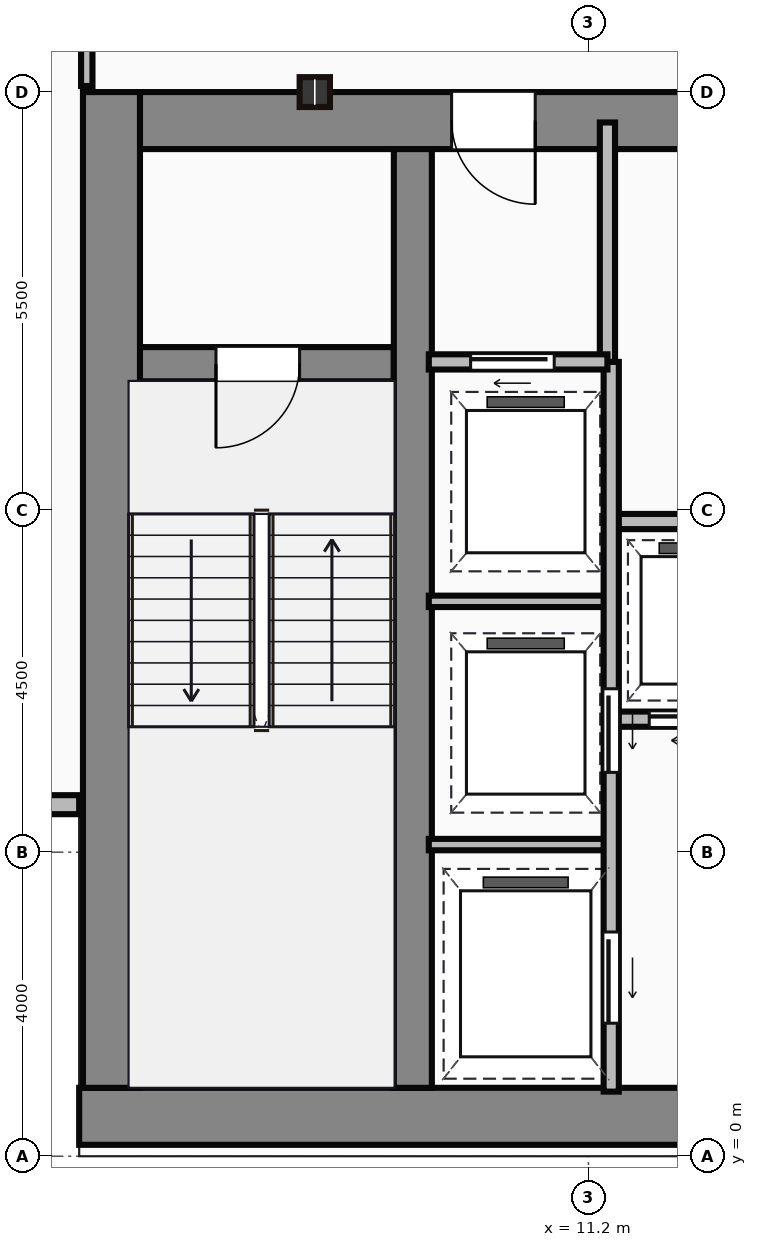
"""IFC4 building model, lengths in metres.
Left out: names, types, materials, properties, quantities, classifications, styles, units other than length and angle.
Written with IfcOpenShell. Run it as: python <this file> out.ifc"""

import sys

from ifc_helpers import new_model, si_unit, direction, frame, frame_2d, origin, origin_2d, place, context, subcontext, project, spatial, rectangle, i_section, extrude, source, transform, mapped, element, fill, save


model = new_model("IFC4")
c1 = context("Model", 3, precision=1e-05, world=origin(), true_north=direction((0.0, 1.0)))
c2 = subcontext(c1, "Body", "Model", "MODEL_VIEW")
j1 = project(units=[si_unit("LENGTHUNIT", "METRE"), si_unit("PLANEANGLEUNIT", "RADIAN")], contexts=[c1])
p1 = place(None, origin())
s1 = spatial("IfcSite", under=j1, at=p1, CompositionType="ELEMENT")
p2 = place(p1, origin())
s2 = spatial("IfcBuilding", under=s1, at=p2, CompositionType="ELEMENT")
p3 = place(p2, frame((0.0, 0.0, 95.95)))
s3 = spatial("IfcBuildingStorey", under=s2, at=p3, CompositionType="ELEMENT", Elevation=95.95)
m1 = source(origin(), c2, "Body", "SweptSolid", [
    extrude(rectangle(XDim=29.5, YDim=0.75, at=frame_2d((14.75, 0.0))), origin(), (0.0, 0.0, 1.0), 3.65),
])
p4 = place(p3, frame((4.5, 0.525, 0.0), z_axis=(0.0, 0.0, 1.0), x_axis=(1.0, 0.0, 0.0)))
e1 = element("IfcWall", 1, at=p4, inside=s3, PredefinedType="SHEAR", context=c2, shape_type="MappedRepresentation", body=[
    mapped(m1, transform((0.0, 0.0, 0.0))),
])
m2 = source(origin(), c2, "Body", "SweptSolid", [
    extrude(rectangle(XDim=13.1, YDim=0.75, at=frame_2d((6.55, 0.0))), origin(), (0.0, 0.0, 1.0), 3.65),
])
p5 = place(p3, frame((4.925, 0.9, 0.0), z_axis=(0.0, 0.0, 1.0), x_axis=(0.0, 1.0, 0.0)))
e2 = element("IfcWall", 2, at=p5, inside=s3, PredefinedType="SHEAR", context=c2, shape_type="MappedRepresentation", body=[
    mapped(m2, transform((0.0, 0.0, 0.0))),
])
m3 = source(origin(), c2, "Body", "SweptSolid", [
    extrude(rectangle(XDim=9.1, YDim=0.75, at=frame_2d((4.55, 0.0))), origin(), (0.0, 0.0, 1.0), 3.65),
])
p6 = place(p3, frame((5.3, 13.625, 0.0), z_axis=(0.0, 0.0, 1.0), x_axis=(1.0, 0.0, 0.0)))
e3 = element("IfcWall", 3, at=p6, inside=s3, PredefinedType="SHEAR", context=c2, shape_type="MappedRepresentation", body=[
    mapped(m3, transform((0.0, 0.0, 0.0))),
])
p7 = place(p6, frame((4.1, 0.0, 0.0)))
e4 = element("IfcOpeningElement", 4, at=p7, cuts=e3, PredefinedType="OPENING", context=c2, shape_type="SweptSolid", body=[
    extrude(rectangle(XDim=1.1, YDim=2.15, at=frame_2d((0.55, 1.075))), frame((0.0, 0.385, 0.0), z_axis=(0.0, -1.0, 0.0), x_axis=(1.0, 0.0, 0.0)), (0.0, 0.0, 1.0), 0.77),
])
m4 = source(origin(), c2, "Body", "SweptSolid", [
    extrude(rectangle(XDim=12.35, YDim=0.5, at=frame_2d((6.175, 0.0))), origin(), (0.0, 0.0, 1.0), 3.65),
])
p8 = place(p3, frame((8.89, 0.9, 0.0), z_axis=(0.0, 0.0, 1.0), x_axis=(0.0, 1.0, 0.0)))
e5 = element("IfcWall", 5, at=p8, inside=s3, PredefinedType="SHEAR", context=c2, shape_type="MappedRepresentation", body=[
    mapped(m4, transform((0.0, 0.0, 0.0))),
])
m5 = source(origin(), c2, "Body", "SweptSolid", [
    extrude(rectangle(XDim=3.39, YDim=0.45, at=frame_2d((1.695, 0.0))), origin(), (0.0, 0.0, 1.0), 3.65),
])
p9 = place(p3, frame((5.25, 10.42, 0.0), z_axis=(0.0, 0.0, 1.0), x_axis=(1.0, 0.0, 0.0)))
e6 = element("IfcWall", 6, at=p9, inside=s3, PredefinedType="SHEAR", context=c2, shape_type="MappedRepresentation", body=[
    mapped(m5, transform((0.0, 0.0, 0.0))),
])
p10 = place(p9, frame((1.05, 0.0, 0.0)))
e7 = element("IfcOpeningElement", 7, at=p10, cuts=e6, PredefinedType="OPENING", context=c2, shape_type="SweptSolid", body=[
    extrude(rectangle(XDim=1.1, YDim=2.15, at=frame_2d((0.55, 1.075))), frame((0.0, 0.235, 0.0), z_axis=(0.0, -1.0, 0.0), x_axis=(1.0, 0.0, 0.0)), (0.0, 0.0, 1.0), 0.47),
])
m6 = source(origin(), c2, "Body", "SweptSolid", [
    extrude(i_section(OverallWidth=0.399, OverallDepth=0.393, WebThickness=0.023, FlangeThickness=0.037, at=origin_2d()), origin(), (0.0, 0.0, 1.0), 3.65),
])
p11 = place(p3, frame((7.6, 14.0, 0.0), z_axis=(0.0, 0.0, 1.0), x_axis=(1.0, 0.0, 0.0)))
e8 = element("IfcColumn", 8, at=p11, inside=s3, PredefinedType="COLUMN", context=c2, shape_type="MappedRepresentation", body=[
    mapped(m6, transform((0.0, 0.0, 0.0))),
])
m7 = source(origin(), c2, "Body", "SweptSolid", [
    extrude(rectangle(XDim=4.5, YDim=0.25, at=frame_2d((2.25, 0.0))), origin(), (0.0, 0.0, 1.0), 3.4),
])
p12 = place(p3, frame((0.0, 4.625, 0.0), z_axis=(0.0, 0.0, 1.0), x_axis=(1.0, 0.0, 0.0)))
e9 = element("IfcWall", 9, at=p12, inside=s3, PredefinedType="STANDARD", context=c2, shape_type="MappedRepresentation", body=[
    mapped(m7, transform((0.0, 0.0, 0.0))),
])
m8 = source(origin(), c2, "Body", "SweptSolid", [
    extrude(rectangle(XDim=3.18, YDim=0.2, at=frame_2d((1.59, 0.0))), origin(), (0.0, 0.0, 1.0), 3.4),
])
p13 = place(p3, frame((11.45, 10.42, 0.0), z_axis=(0.0, 0.0, 1.0), x_axis=(0.0, 1.0, 0.0)))
e10 = element("IfcWall", 10, at=p13, inside=s3, PredefinedType="PARTITIONING", context=c2, shape_type="MappedRepresentation", body=[
    mapped(m8, transform((0.0, 0.0, 0.0))),
])
m9 = source(origin(), c2, "Body", "SweptSolid", [
    extrude(rectangle(XDim=2.35, YDim=0.2, at=frame_2d((1.175, 0.0))), origin(), (0.0, 0.0, 1.0), 3.4),
])
p14 = place(p3, frame((9.1, 10.45, 0.0), z_axis=(0.0, 0.0, 1.0), x_axis=(1.0, 0.0, 0.0)))
e11 = element("IfcWall", 11, at=p14, inside=s3, PredefinedType="PARTITIONING", context=c2, shape_type="MappedRepresentation", body=[
    mapped(m9, transform((0.0, 0.0, 0.0))),
])
p15 = place(p14, frame((0.55, 0.0, 0.0)))
e12 = element("IfcOpeningElement", 12, at=p15, cuts=e11, PredefinedType="OPENING", context=c2, shape_type="SweptSolid", body=[
    extrude(rectangle(XDim=1.1, YDim=2.15, at=frame_2d((0.55, 1.075))), frame((0.0, 0.11, 0.0), z_axis=(0.0, -1.0, 0.0), x_axis=(1.0, 0.0, 0.0)), (0.0, 0.0, 1.0), 0.22),
])
m10 = source(origin(), c2, "Body", "SweptSolid", [
    extrude(rectangle(XDim=9.6, YDim=0.2, at=frame_2d((4.8, 0.0))), origin(), (0.0, 0.0, 1.0), 3.4),
])
p16 = place(p3, frame((11.5, 0.85, 0.0), z_axis=(0.0, 0.0, 1.0), x_axis=(0.0, 1.0, 0.0)))
e13 = element("IfcWall", 13, at=p16, inside=s3, PredefinedType="PARTITIONING", context=c2, shape_type="MappedRepresentation", body=[
    mapped(m10, transform((0.0, 0.0, 0.0))),
])
p17 = place(p16, frame((4.2, 0.0, 0.0)))
e14 = element("IfcOpeningElement", 14, at=p17, cuts=e13, PredefinedType="OPENING", context=c2, shape_type="SweptSolid", body=[
    extrude(rectangle(XDim=1.1, YDim=2.15, at=frame_2d((0.55, 1.075))), frame((0.0, 0.11, 0.0), z_axis=(0.0, -1.0, 0.0), x_axis=(1.0, 0.0, 0.0)), (0.0, 0.0, 1.0), 0.22),
])
p18 = place(p16, frame((0.9, 0.0, 0.0)))
e15 = element("IfcOpeningElement", 15, at=p18, cuts=e13, PredefinedType="OPENING", context=c2, shape_type="SweptSolid", body=[
    extrude(rectangle(XDim=1.2, YDim=2.15, at=frame_2d((0.6, 1.075))), frame((0.0, 0.11, 0.0), z_axis=(0.0, -1.0, 0.0), x_axis=(1.0, 0.0, 0.0)), (0.0, 0.0, 1.0), 0.22),
])
m11 = source(origin(), c2, "Body", "SweptSolid", [
    extrude(rectangle(XDim=2.4, YDim=0.15, at=frame_2d((1.2, 0.0))), origin(), (0.0, 0.0, 1.0), 3.4),
])
for number, where, z_axis, x_axis in (
    (16, (9.1, 4.1, 0.0), (0.0, 0.0, 1.0), (1.0, 0.0, 0.0)),
    (17, (9.1, 7.3, 0.0), (0.0, 0.0, 1.0), (1.0, 0.0, 0.0)),
):
    element("IfcWall", number, at=place(p3, frame(where, z_axis=z_axis, x_axis=x_axis)), inside=s3, PredefinedType="PARTITIONING", context=c2, shape_type="MappedRepresentation", body=[
        mapped(m11, transform((0.0, 0.0, 0.0))),
    ])
m12 = source(origin(), c2, "Body", "SweptSolid", [
    extrude(rectangle(XDim=11.85, YDim=0.2, at=frame_2d((5.925, 0.0))), origin(), (0.0, 0.0, 1.0), 3.4),
])
p19 = place(p3, frame((11.55, 5.75, 0.0), z_axis=(0.0, 0.0, 1.0), x_axis=(1.0, 0.0, 0.0)))
e18 = element("IfcWall", 18, at=p19, inside=s3, PredefinedType="PARTITIONING", context=c2, shape_type="MappedRepresentation", body=[
    mapped(m12, transform((0.0, 0.0, 0.0))),
])
p20 = place(p19, frame((0.45, 0.0, 0.0)))
e19 = element("IfcOpeningElement", 19, at=p20, cuts=e18, PredefinedType="OPENING", context=c2, shape_type="SweptSolid", body=[
    extrude(rectangle(XDim=1.05, YDim=2.15, at=frame_2d((0.525, 1.075))), frame((0.0, 0.11, 0.0), z_axis=(0.0, -1.0, 0.0), x_axis=(1.0, 0.0, 0.0)), (0.0, 0.0, 1.0), 0.22),
])
p21 = place(p19, frame((2.4, 0.0, 0.0)))
e20 = element("IfcOpeningElement", 20, at=p21, cuts=e18, PredefinedType="OPENING", context=c2, shape_type="SweptSolid", body=[
    extrude(rectangle(XDim=1.05, YDim=2.15, at=frame_2d((0.525, 1.075))), frame((0.0, 0.11, 0.0), z_axis=(0.0, -1.0, 0.0), x_axis=(1.0, 0.0, 0.0)), (0.0, 0.0, 1.0), 0.22),
])
p22 = place(p19, frame((4.35, 0.0, 0.0)))
e21 = element("IfcOpeningElement", 21, at=p22, cuts=e18, PredefinedType="OPENING", context=c2, shape_type="SweptSolid", body=[
    extrude(rectangle(XDim=1.05, YDim=2.15, at=frame_2d((0.525, 1.075))), frame((0.0, 0.11, 0.0), z_axis=(0.0, -1.0, 0.0), x_axis=(1.0, 0.0, 0.0)), (0.0, 0.0, 1.0), 0.22),
])
p23 = place(p19, frame((6.3, 0.0, 0.0)))
e22 = element("IfcOpeningElement", 22, at=p23, cuts=e18, PredefinedType="OPENING", context=c2, shape_type="SweptSolid", body=[
    extrude(rectangle(XDim=1.05, YDim=2.15, at=frame_2d((0.525, 1.075))), frame((0.0, 0.11, 0.0), z_axis=(0.0, -1.0, 0.0), x_axis=(1.0, 0.0, 0.0)), (0.0, 0.0, 1.0), 0.22),
])
p24 = place(p19, frame((8.25, 0.0, 0.0)))
e23 = element("IfcOpeningElement", 23, at=p24, cuts=e18, PredefinedType="OPENING", context=c2, shape_type="SweptSolid", body=[
    extrude(rectangle(XDim=1.05, YDim=2.15, at=frame_2d((0.525, 1.075))), frame((0.0, 0.11, 0.0), z_axis=(0.0, -1.0, 0.0), x_axis=(1.0, 0.0, 0.0)), (0.0, 0.0, 1.0), 0.22),
])
p25 = place(p19, frame((10.2, 0.0, 0.0)))
e24 = element("IfcOpeningElement", 24, at=p25, cuts=e18, PredefinedType="OPENING", context=c2, shape_type="SweptSolid", body=[
    extrude(rectangle(XDim=1.05, YDim=2.15, at=frame_2d((0.525, 1.075))), frame((0.0, 0.11, 0.0), z_axis=(0.0, -1.0, 0.0), x_axis=(1.0, 0.0, 0.0)), (0.0, 0.0, 1.0), 0.22),
])
p26 = place(p3, frame((11.55, 8.35, 0.0), z_axis=(0.0, 0.0, 1.0), x_axis=(1.0, 0.0, 0.0)))
e25 = element("IfcWall", 25, at=p26, inside=s3, PredefinedType="PARTITIONING", context=c2, shape_type="MappedRepresentation", body=[
    mapped(m12, transform((0.0, 0.0, 0.0))),
])
m13 = source(origin(), c2, "Body", "SweptSolid", [
    extrude(rectangle(XDim=2.22, YDim=0.15, at=frame_2d((1.11, 0.0))), origin(), (0.0, 0.0, 1.0), 3.4),
])
p27 = place(p3, frame((4.6, 14.08, 0.0), z_axis=(0.0, 0.0, 1.0), x_axis=(0.0, 1.0, 0.0)))
e26 = element("IfcWall", 26, at=p27, inside=s3, PredefinedType="PARTITIONING", context=c2, shape_type="MappedRepresentation", body=[
    mapped(m13, transform((0.0, 0.0, 0.0))),
])
m14 = source(origin(), c2, "Body", "SweptSolid", [
    extrude(rectangle(XDim=1.1, YDim=2.15, at=frame_2d((0.55, 1.075))), frame((0.0, 0.025, 0.0), z_axis=(0.0, -1.0, 0.0), x_axis=(1.0, 0.0, 0.0)), (0.0, 0.0, 1.0), 0.05),
])
p28 = place(p10, frame((1.1, 0.0, 0.0), z_axis=(0.0, 0.0, 1.0), x_axis=(-1.0, 0.0, 0.0)))
e27 = element("IfcDoor", 27, at=p28, inside=s3, OperationType="SINGLE_SWING_LEFT", PredefinedType="DOOR", context=c2, shape_type="MappedRepresentation", body=[
    mapped(m14, transform((0.0, 0.0, 0.0))),
])
fill(e7, e27)
p29 = place(p7, origin())
e28 = element("IfcDoor", 28, at=p29, inside=s3, OperationType="SINGLE_SWING_RIGHT", PredefinedType="DOOR", context=c2, shape_type="MappedRepresentation", body=[
    mapped(m14, transform((0.0, 0.0, 0.0))),
])
fill(e4, e28)
p30 = place(p15, origin())
e29 = element("IfcDoor", 29, at=p30, inside=s3, OperationType="SLIDING_TO_LEFT", PredefinedType="DOOR", context=c2, shape_type="MappedRepresentation", body=[
    mapped(m14, transform((0.0, 0.0, 0.0))),
])
fill(e12, e29)
p31 = place(p17, frame((1.1, 0.0, 0.0), z_axis=(0.0, 0.0, 1.0), x_axis=(-1.0, 0.0, 0.0)))
e30 = element("IfcDoor", 30, at=p31, inside=s3, OperationType="SLIDING_TO_LEFT", PredefinedType="DOOR", context=c2, shape_type="MappedRepresentation", body=[
    mapped(m14, transform((0.0, 0.0, 0.0))),
])
fill(e14, e30)
m15 = source(origin(), c2, "Body", "SweptSolid", [
    extrude(rectangle(XDim=1.2, YDim=2.15, at=frame_2d((0.6, 1.075))), frame((0.0, 0.025, 0.0), z_axis=(0.0, -1.0, 0.0), x_axis=(1.0, 0.0, 0.0)), (0.0, 0.0, 1.0), 0.05),
])
p32 = place(p18, frame((1.2, 0.0, 0.0), z_axis=(0.0, 0.0, 1.0), x_axis=(-1.0, 0.0, 0.0)))
e31 = element("IfcDoor", 31, at=p32, inside=s3, OperationType="SLIDING_TO_LEFT", PredefinedType="DOOR", context=c2, shape_type="MappedRepresentation", body=[
    mapped(m15, transform((0.0, 0.0, 0.0))),
])
fill(e15, e31)
m16 = source(origin(), c2, "Body", "SweptSolid", [
    extrude(rectangle(XDim=1.05, YDim=2.15, at=frame_2d((0.525, 1.075))), frame((0.0, 0.025, 0.0), z_axis=(0.0, -1.0, 0.0), x_axis=(1.0, 0.0, 0.0)), (0.0, 0.0, 1.0), 0.05),
])
p33 = place(p20, frame((1.05, 0.0, 0.0), z_axis=(0.0, 0.0, 1.0), x_axis=(-1.0, 0.0, 0.0)))
e32 = element("IfcDoor", 32, at=p33, inside=s3, OperationType="SLIDING_TO_LEFT", PredefinedType="DOOR", context=c2, shape_type="MappedRepresentation", body=[
    mapped(m16, transform((0.0, 0.0, 0.0))),
])
fill(e19, e32)
save(model, sys.argv[1])
